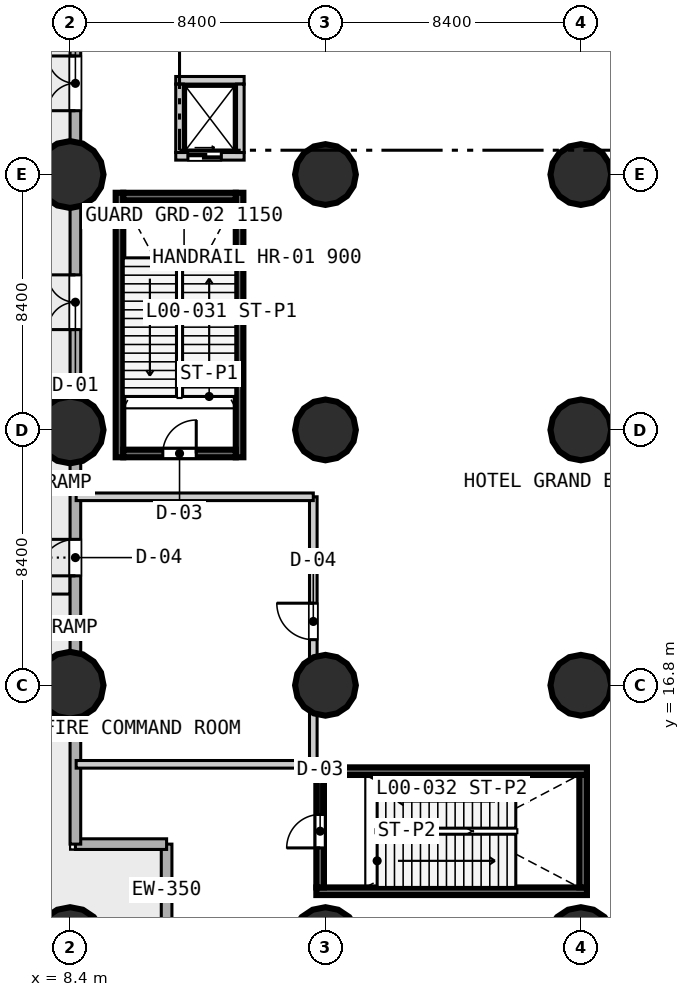
"""IFC4 building model, lengths in metres.
Left out: names, types, materials, properties, quantities, classifications, styles, units other than length and angle.
Written with IfcOpenShell. Run it as: python <this file> out.ifc"""

import sys

from ifc_helpers import new_model, si_unit, direction, frame, frame_2d, origin, origin_2d, place, context, subcontext, project, spatial, rectangle, circle, extrude, element, fill, save


model = new_model("IFC4")
c1 = context("Model", 3, precision=1e-05, world=origin(), true_north=direction((0.0, 1.0)))
c2 = subcontext(c1, "Body", "Model", "MODEL_VIEW")
j1 = project(units=[si_unit("LENGTHUNIT", "METRE"), si_unit("PLANEANGLEUNIT", "RADIAN")], contexts=[c1])
p1 = place(None, origin())
s1 = spatial("IfcSite", under=j1, at=p1, CompositionType="ELEMENT")
p2 = place(p1, origin())
s2 = spatial("IfcBuilding", under=s1, at=p2, CompositionType="ELEMENT")
p3 = place(p2, origin())
s3 = spatial("IfcBuildingStorey", under=s2, at=p3, CompositionType="ELEMENT", Elevation=0.0)
for number, where, z_axis, x_axis in (
    (1, (10.025, 24.3, 0.0), (0.0, 0.0, 1.0), (0.0, 1.0, 0.0)),
    (2, (13.975, 24.3, 0.0), (0.0, 0.0, 1.0), (0.0, 1.0, 0.0)),
):
    element("IfcWall", number, at=place(p3, frame(where, z_axis=z_axis, x_axis=x_axis)), inside=s3, PredefinedType="SOLIDWALL", context=c2, shape_type="SweptSolid", body=[
        extrude(rectangle(XDim=8.7, YDim=0.25, at=frame_2d((4.35, 0.0))), origin(), (0.0, 0.0, 1.0), 5.65),
    ])
p4 = place(p3, frame((10.15, 32.875, 0.0), z_axis=(0.0, 0.0, 1.0), x_axis=(1.0, 0.0, 0.0)))
e3 = element("IfcWall", 3, at=p4, inside=s3, PredefinedType="SOLIDWALL", context=c2, shape_type="SweptSolid", body=[
    extrude(rectangle(XDim=3.7, YDim=0.25, at=frame_2d((1.85, 0.0))), origin(), (0.0, 0.0, 1.0), 5.65),
])
for number, where, z_axis, x_axis in (
    (4, (16.5, 10.025, 0.0), (0.0, 0.0, 1.0), (1.0, 0.0, 0.0)),
    (5, (16.5, 13.975, 0.0), (0.0, 0.0, 1.0), (1.0, 0.0, 0.0)),
):
    element("IfcWall", number, at=place(p3, frame(where, z_axis=z_axis, x_axis=x_axis)), inside=s3, PredefinedType="SOLIDWALL", context=c2, shape_type="SweptSolid", body=[
        extrude(rectangle(XDim=8.9, YDim=0.25, at=frame_2d((4.45, 0.0))), origin(), (0.0, 0.0, 1.0), 5.65),
    ])
p5 = place(p3, frame((25.275, 10.15, 0.0), z_axis=(0.0, 0.0, 1.0), x_axis=(0.0, 1.0, 0.0)))
e6 = element("IfcWall", 6, at=p5, inside=s3, PredefinedType="SOLIDWALL", context=c2, shape_type="SweptSolid", body=[
    extrude(rectangle(XDim=3.7, YDim=0.25, at=frame_2d((1.85, 0.0))), origin(), (0.0, 0.0, 1.0), 5.65),
])
for number, where, z_axis, x_axis in (
    (7, (8.4, 8.4, 0.0), (0.0, 0.0, 1.0), (1.0, 0.0, 0.0)),
    (8, (8.4, 16.8, 0.0), (0.0, 0.0, 1.0), (1.0, 0.0, 0.0)),
    (9, (8.4, 25.2, 0.0), (0.0, 0.0, 1.0), (1.0, 0.0, 0.0)),
    (10, (8.4, 33.6, 0.0), (0.0, 0.0, 1.0), (1.0, 0.0, 0.0)),
    (11, (16.8, 8.4, 0.0), (0.0, 0.0, 1.0), (1.0, 0.0, 0.0)),
):
    element("IfcColumn", number, at=place(p3, frame(where, z_axis=z_axis, x_axis=x_axis)), inside=s3, PredefinedType="USERDEFINED", context=c2, shape_type="SweptSolid", body=[
        extrude(circle(Radius=1.1, at=origin_2d()), origin(), (0.0, 0.0, 1.0), 6.0),
    ])
for number, where, z_axis, x_axis in (
    (12, (16.8, 16.8, 0.0), (0.0, 0.0, 1.0), (1.0, 0.0, 0.0)),
    (13, (16.8, 25.2, 0.0), (0.0, 0.0, 1.0), (1.0, 0.0, 0.0)),
    (14, (16.8, 33.6, 0.0), (0.0, 0.0, 1.0), (1.0, 0.0, 0.0)),
):
    element("IfcColumn", number, at=place(p3, frame(where, z_axis=z_axis, x_axis=x_axis)), inside=s3, PredefinedType="USERDEFINED", context=c2, shape_type="SweptSolid", body=[
        extrude(circle(Radius=1.0, at=origin_2d()), origin(), (0.0, 0.0, 1.0), 6.0),
    ])
p6 = place(p3, frame((25.2, 8.4, 0.0), z_axis=(0.0, 0.0, 1.0), x_axis=(1.0, 0.0, 0.0)))
e15 = element("IfcColumn", 15, at=p6, inside=s3, PredefinedType="USERDEFINED", context=c2, shape_type="SweptSolid", body=[
    extrude(circle(Radius=1.1, at=origin_2d()), origin(), (0.0, 0.0, 1.0), 6.0),
])
for number, where, z_axis, x_axis in (
    (16, (25.2, 16.8, 0.0), (0.0, 0.0, 1.0), (1.0, 0.0, 0.0)),
    (17, (25.2, 25.2, 0.0), (0.0, 0.0, 1.0), (1.0, 0.0, 0.0)),
    (18, (25.2, 33.6, 0.0), (0.0, 0.0, 1.0), (1.0, 0.0, 0.0)),
):
    element("IfcColumn", number, at=place(p3, frame(where, z_axis=z_axis, x_axis=x_axis)), inside=s3, PredefinedType="USERDEFINED", context=c2, shape_type="SweptSolid", body=[
        extrude(circle(Radius=1.0, at=origin_2d()), origin(), (0.0, 0.0, 1.0), 6.0),
    ])
for number, where, z_axis, x_axis in (
    (19, (11.575, 8.575, 0.0), (0.0, 0.0, 1.0), (0.0, 1.0, 0.0)),
    (20, (11.575, 11.575, 0.0), (0.0, 0.0, 1.0), (-1.0, 0.0, 0.0)),
):
    element("IfcWall", number, at=place(p3, frame(where, z_axis=z_axis, x_axis=x_axis)), inside=s3, PredefinedType="STANDARD", context=c2, shape_type="SweptSolid", body=[
        extrude(rectangle(XDim=3.0, YDim=0.35, at=frame_2d((1.5, 0.0))), origin(), (0.0, 0.0, 1.0), 5.65),
    ])
p7 = place(p3, frame((8.575, 11.575, 0.0), z_axis=(0.0, 0.0, 1.0), x_axis=(0.0, 1.0, 0.0)))
e21 = element("IfcWall", 21, at=p7, inside=s3, PredefinedType="STANDARD", context=c2, shape_type="SweptSolid", body=[
    extrude(rectangle(XDim=52.45, YDim=0.35, at=frame_2d((26.225, 0.0))), origin(), (0.0, 0.0, 1.0), 4.8),
])
p8 = place(p7, frame((24.125, 0.0, 0.0)))
e22 = element("IfcOpeningElement", 22, at=p8, cuts=e21, PredefinedType="OPENING", context=c2, shape_type="SweptSolid", body=[
    extrude(rectangle(XDim=1.8, YDim=2.2, at=frame_2d((0.9, 1.1))), frame((0.0, 0.185, 0.0), z_axis=(0.0, -1.0, 0.0), x_axis=(1.0, 0.0, 0.0)), (0.0, 0.0, 1.0), 0.37),
])
p9 = place(p7, frame((33.725, 0.0, 0.0)))
e23 = element("IfcOpeningElement", 23, at=p9, cuts=e21, PredefinedType="OPENING", context=c2, shape_type="SweptSolid", body=[
    extrude(rectangle(XDim=1.8, YDim=2.2, at=frame_2d((0.9, 1.1))), frame((0.0, 0.185, 0.0), z_axis=(0.0, -1.0, 0.0), x_axis=(1.0, 0.0, 0.0)), (0.0, 0.0, 1.0), 0.37),
])
p10 = place(p7, frame((42.125, 0.0, 0.0)))
e24 = element("IfcOpeningElement", 24, at=p10, cuts=e21, PredefinedType="OPENING", context=c2, shape_type="SweptSolid", body=[
    extrude(rectangle(XDim=1.8, YDim=2.2, at=frame_2d((0.9, 1.1))), frame((0.0, 0.185, 0.0), z_axis=(0.0, -1.0, 0.0), x_axis=(1.0, 0.0, 0.0)), (0.0, 0.0, 1.0), 0.37),
])
p11 = place(p7, frame((49.025, 0.0, 0.0)))
e25 = element("IfcOpeningElement", 25, at=p11, cuts=e21, PredefinedType="OPENING", context=c2, shape_type="SweptSolid", body=[
    extrude(rectangle(XDim=1.8, YDim=2.2, at=frame_2d((0.9, 1.1))), frame((0.0, 0.185, 0.0), z_axis=(0.0, -1.0, 0.0), x_axis=(1.0, 0.0, 0.0)), (0.0, 0.0, 1.0), 0.37),
])
p12 = place(p7, frame((16.925, 0.0, 0.0)))
e26 = element("IfcOpeningElement", 26, at=p12, cuts=e21, PredefinedType="OPENING", context=c2, shape_type="SweptSolid", body=[
    extrude(rectangle(XDim=1.8, YDim=2.2, at=frame_2d((0.9, 1.1))), frame((0.0, 0.185, 0.0), z_axis=(0.0, -1.0, 0.0), x_axis=(1.0, 0.0, 0.0)), (0.0, 0.0, 1.0), 0.37),
])
p13 = place(p7, frame((8.825, 0.0, 0.0)))
e27 = element("IfcOpeningElement", 27, at=p13, cuts=e21, PredefinedType="OPENING", context=c2, shape_type="SweptSolid", body=[
    extrude(rectangle(XDim=1.2, YDim=2.15, at=frame_2d((0.6, 1.075))), frame((0.0, 0.185, 0.0), z_axis=(0.0, -1.0, 0.0), x_axis=(1.0, 0.0, 0.0)), (0.0, 0.0, 1.0), 0.37),
])
p14 = place(p3, frame((11.875, 34.2, 0.0), z_axis=(0.0, 0.0, 1.0), x_axis=(1.0, 0.0, 0.0)))
e28 = element("IfcWall", 28, at=p14, inside=s3, PredefinedType="SOLIDWALL", context=c2, shape_type="SweptSolid", body=[
    extrude(rectangle(XDim=2.25, YDim=0.25, at=frame_2d((1.125, 0.0))), origin(), (0.0, 0.0, 1.0), 5.65),
])
p15 = place(p14, frame((0.4, 0.0, 0.0)))
e29 = element("IfcOpeningElement", 29, at=p15, cuts=e28, PredefinedType="OPENING", context=c2, shape_type="SweptSolid", body=[
    extrude(rectangle(XDim=1.1, YDim=2.15, at=frame_2d((0.55, 1.075))), frame((0.0, 0.135, 0.0), z_axis=(0.0, -1.0, 0.0), x_axis=(1.0, 0.0, 0.0)), (0.0, 0.0, 1.0), 0.27),
])
for number, where, z_axis, x_axis in (
    (30, (11.875, 36.7, 0.0), (0.0, 0.0, 1.0), (1.0, 0.0, 0.0)),
    (31, (12.0, 34.325, 0.0), (0.0, 0.0, 1.0), (0.0, 1.0, 0.0)),
    (32, (14.0, 34.325, 0.0), (0.0, 0.0, 1.0), (0.0, 1.0, 0.0)),
):
    element("IfcWall", number, at=place(p3, frame(where, z_axis=z_axis, x_axis=x_axis)), inside=s3, PredefinedType="SOLIDWALL", context=c2, shape_type="SweptSolid", body=[
        extrude(rectangle(XDim=2.25, YDim=0.25, at=frame_2d((1.125, 0.0))), origin(), (0.0, 0.0, 1.0), 5.65),
    ])
p16 = place(p3, frame((10.15, 24.425, 0.0), z_axis=(0.0, 0.0, 1.0), x_axis=(1.0, 0.0, 0.0)))
e33 = element("IfcWall", 33, at=p16, inside=s3, PredefinedType="SOLIDWALL", context=c2, shape_type="SweptSolid", body=[
    extrude(rectangle(XDim=3.7, YDim=0.25, at=frame_2d((1.85, 0.0))), origin(), (0.0, 0.0, 1.0), 5.65),
])
p17 = place(p16, frame((1.3, 0.0, 0.0)))
e34 = element("IfcOpeningElement", 34, at=p17, cuts=e33, PredefinedType="OPENING", context=c2, shape_type="SweptSolid", body=[
    extrude(rectangle(XDim=1.1, YDim=2.15, at=frame_2d((0.55, 1.075))), frame((0.0, 0.135, 0.0), z_axis=(0.0, -1.0, 0.0), x_axis=(1.0, 0.0, 0.0)), (0.0, 0.0, 1.0), 0.27),
])
p18 = place(p3, frame((16.625, 10.15, 0.0), z_axis=(0.0, 0.0, 1.0), x_axis=(0.0, 1.0, 0.0)))
e35 = element("IfcWall", 35, at=p18, inside=s3, PredefinedType="SOLIDWALL", context=c2, shape_type="SweptSolid", body=[
    extrude(rectangle(XDim=3.7, YDim=0.25, at=frame_2d((1.85, 0.0))), origin(), (0.0, 0.0, 1.0), 5.65),
])
p19 = place(p18, frame((1.3, 0.0, 0.0)))
e36 = element("IfcOpeningElement", 36, at=p19, cuts=e35, PredefinedType="OPENING", context=c2, shape_type="SweptSolid", body=[
    extrude(rectangle(XDim=1.1, YDim=2.15, at=frame_2d((0.55, 1.075))), frame((0.0, 0.135, 0.0), z_axis=(0.0, -1.0, 0.0), x_axis=(1.0, 0.0, 0.0)), (0.0, 0.0, 1.0), 0.27),
])
p20 = place(p3, frame((16.4, 14.2, 0.0), z_axis=(0.0, 0.0, 1.0), x_axis=(0.0, 1.0, 0.0)))
e37 = element("IfcWall", 37, at=p20, inside=s3, PredefinedType="SOLIDWALL", context=c2, shape_type="SweptSolid", body=[
    extrude(rectangle(XDim=8.8, YDim=0.25, at=frame_2d((4.4, 0.0))), origin(), (0.0, 0.0, 1.0), 4.8),
])
p21 = place(p20, frame((4.1, 0.0, 0.0)))
e38 = element("IfcOpeningElement", 38, at=p21, cuts=e37, PredefinedType="OPENING", context=c2, shape_type="SweptSolid", body=[
    extrude(rectangle(XDim=1.2, YDim=2.15, at=frame_2d((0.6, 1.075))), frame((0.0, 0.135, 0.0), z_axis=(0.0, -1.0, 0.0), x_axis=(1.0, 0.0, 0.0)), (0.0, 0.0, 1.0), 0.27),
])
for number, where, z_axis, x_axis in (
    (39, (8.6, 14.2, 0.0), (0.0, 0.0, 1.0), (1.0, 0.0, 0.0)),
    (40, (8.6, 23.0, 0.0), (0.0, 0.0, 1.0), (1.0, 0.0, 0.0)),
):
    element("IfcWall", number, at=place(p3, frame(where, z_axis=z_axis, x_axis=x_axis)), inside=s3, PredefinedType="SOLIDWALL", context=c2, shape_type="SweptSolid", body=[
        extrude(rectangle(XDim=7.8, YDim=0.25, at=frame_2d((3.9, 0.0))), origin(), (0.0, 0.0, 1.0), 5.65),
    ])
p22 = place(p8, origin())
e41 = element("IfcDoor", 41, at=p22, inside=s3, OperationType="DOUBLE_SWING_LEFT", PredefinedType="DOOR", context=c2, shape_type="SweptSolid", body=[
    extrude(rectangle(XDim=1.8, YDim=2.2, at=frame_2d((0.9, 1.1))), frame((0.0, 0.025, 0.0), z_axis=(0.0, -1.0, 0.0), x_axis=(1.0, 0.0, 0.0)), (0.0, 0.0, 1.0), 0.05),
])
fill(e22, e41)
p23 = place(p12, origin())
e42 = element("IfcDoor", 42, at=p23, inside=s3, OperationType="DOUBLE_SWING_LEFT", PredefinedType="DOOR", context=c2, shape_type="SweptSolid", body=[
    extrude(rectangle(XDim=1.8, YDim=2.2, at=frame_2d((0.9, 1.1))), frame((0.0, 0.025, 0.0), z_axis=(0.0, -1.0, 0.0), x_axis=(1.0, 0.0, 0.0)), (0.0, 0.0, 1.0), 0.05),
])
fill(e26, e42)
p24 = place(p13, origin())
e43 = element("IfcDoor", 43, at=p24, inside=s3, OperationType="SINGLE_SWING_LEFT", PredefinedType="DOOR", context=c2, shape_type="SweptSolid", body=[
    extrude(rectangle(XDim=1.2, YDim=2.15, at=frame_2d((0.6, 1.075))), frame((0.0, 0.025, 0.0), z_axis=(0.0, -1.0, 0.0), x_axis=(1.0, 0.0, 0.0)), (0.0, 0.0, 1.0), 0.05),
])
fill(e27, e43)
p25 = place(p15, origin())
e44 = element("IfcDoor", 44, at=p25, inside=s3, OperationType="SLIDING_TO_LEFT", PredefinedType="DOOR", context=c2, shape_type="SweptSolid", body=[
    extrude(rectangle(XDim=1.1, YDim=2.15, at=frame_2d((0.55, 1.075))), frame((0.0, 0.025, 0.0), z_axis=(0.0, -1.0, 0.0), x_axis=(1.0, 0.0, 0.0)), (0.0, 0.0, 1.0), 0.05),
])
fill(e29, e44)
p26 = place(p17, origin())
e45 = element("IfcDoor", 45, at=p26, inside=s3, OperationType="SINGLE_SWING_RIGHT", PredefinedType="DOOR", context=c2, shape_type="SweptSolid", body=[
    extrude(rectangle(XDim=1.1, YDim=2.15, at=frame_2d((0.55, 1.075))), frame((0.0, 0.025, 0.0), z_axis=(0.0, -1.0, 0.0), x_axis=(1.0, 0.0, 0.0)), (0.0, 0.0, 1.0), 0.05),
])
fill(e34, e45)
p27 = place(p19, origin())
e46 = element("IfcDoor", 46, at=p27, inside=s3, OperationType="SINGLE_SWING_LEFT", PredefinedType="DOOR", context=c2, shape_type="SweptSolid", body=[
    extrude(rectangle(XDim=1.1, YDim=2.15, at=frame_2d((0.55, 1.075))), frame((0.0, 0.025, 0.0), z_axis=(0.0, -1.0, 0.0), x_axis=(1.0, 0.0, 0.0)), (0.0, 0.0, 1.0), 0.05),
])
fill(e36, e46)
p28 = place(p21, origin())
e47 = element("IfcDoor", 47, at=p28, inside=s3, OperationType="SINGLE_SWING_RIGHT", PredefinedType="DOOR", context=c2, shape_type="SweptSolid", body=[
    extrude(rectangle(XDim=1.2, YDim=2.15, at=frame_2d((0.6, 1.075))), frame((0.0, 0.025, 0.0), z_axis=(0.0, -1.0, 0.0), x_axis=(1.0, 0.0, 0.0)), (0.0, 0.0, 1.0), 0.05),
])
fill(e38, e47)
save(model, sys.argv[1])
